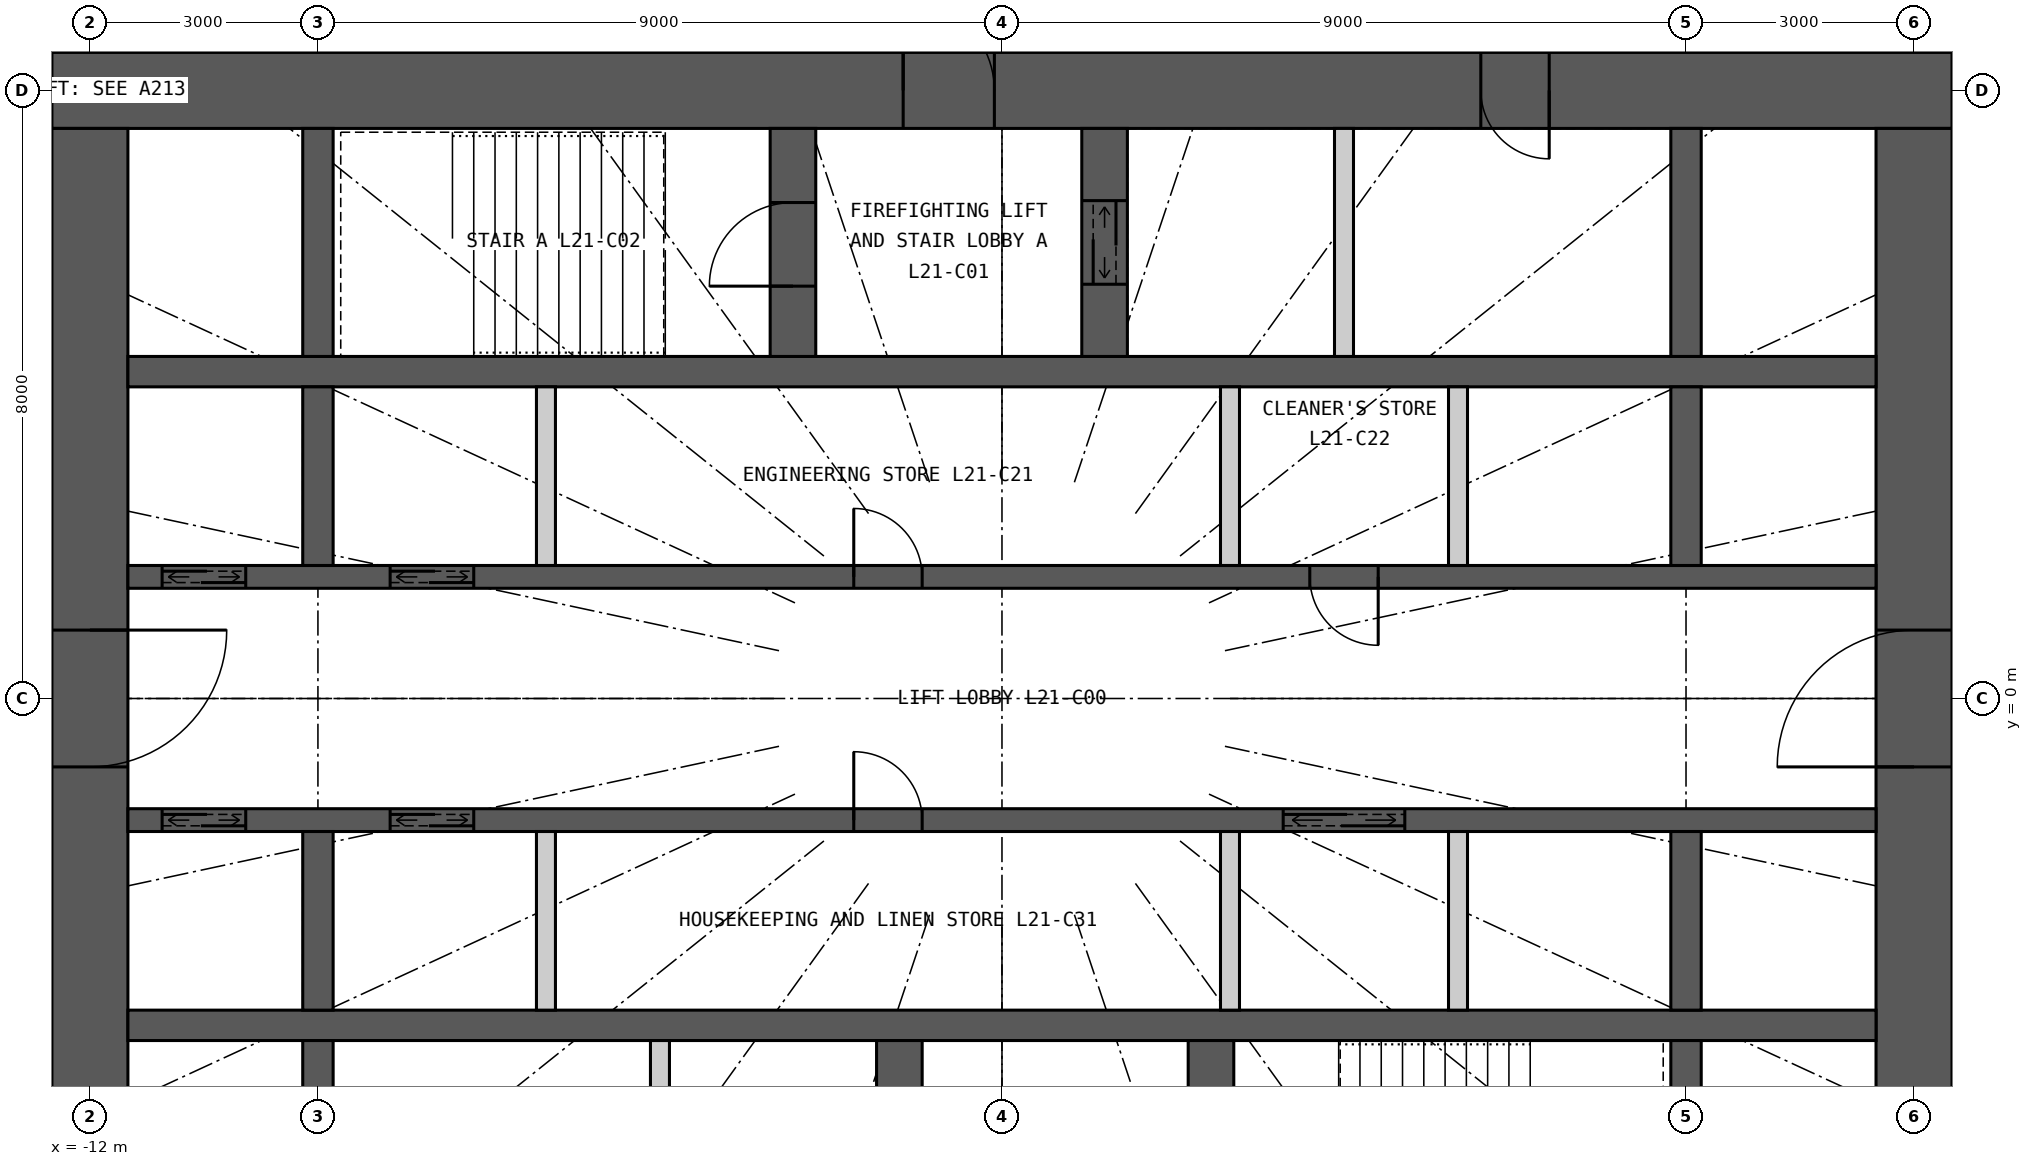
"""IFC4 building model, lengths in metres.
Left out: names, types, materials, properties, quantities, classifications, styles, units other than length and angle.
Written with IfcOpenShell. Run it as: python <this file> out.ifc"""

import sys

from ifc_helpers import new_model, si_unit, direction, frame, frame_2d, origin, place, context, subcontext, project, spatial, rectangle, extrude, element, fill, save


model = new_model("IFC4")
c1 = context("Model", 3, precision=1e-05, world=origin(), true_north=direction((0.0, 1.0)))
c2 = subcontext(c1, "Body", "Model", "MODEL_VIEW")
j1 = project(units=[si_unit("LENGTHUNIT", "METRE"), si_unit("PLANEANGLEUNIT", "RADIAN")], contexts=[c1])
p1 = place(None, origin())
s1 = spatial("IfcSite", under=j1, at=p1, CompositionType="ELEMENT")
p2 = place(p1, origin())
s2 = spatial("IfcBuilding", under=s1, at=p2, CompositionType="ELEMENT")
p3 = place(p2, frame((0.0, 0.0, 83.7)))
s3 = spatial("IfcBuildingStorey", under=s2, at=p3, CompositionType="ELEMENT", Elevation=83.7)
p4 = place(p3, frame((-12.5, 8.0, 0.0), z_axis=(0.0, 0.0, 1.0), x_axis=(1.0, 0.0, 0.0)))
e1 = element("IfcWall", 1, at=p4, inside=s3, PredefinedType="SHEAR", context=c2, shape_type="SweptSolid", body=[
    extrude(rectangle(XDim=25.0, YDim=1.0, at=frame_2d((12.5, 0.0))), origin(), (0.0, 0.0, 1.0), 3.3),
])
p5 = place(p4, frame((11.2, 0.0, 0.0)))
e2 = element("IfcOpeningElement", 2, at=p5, cuts=e1, PredefinedType="OPENING", context=c2, shape_type="SweptSolid", body=[
    extrude(rectangle(XDim=1.2, YDim=2.2, at=frame_2d((0.6, 1.1))), frame((0.0, 0.51, 0.0), z_axis=(0.0, -1.0, 0.0), x_axis=(1.0, 0.0, 0.0)), (0.0, 0.0, 1.0), 1.02),
])
p6 = place(p4, frame((18.8, 0.0, 0.0)))
e3 = element("IfcOpeningElement", 3, at=p6, cuts=e1, PredefinedType="OPENING", context=c2, shape_type="SweptSolid", body=[
    extrude(rectangle(XDim=0.9, YDim=2.2, at=frame_2d((0.45, 1.1))), frame((0.0, 0.51, 0.0), z_axis=(0.0, -1.0, 0.0), x_axis=(1.0, 0.0, 0.0)), (0.0, 0.0, 1.0), 1.02),
])
p7 = place(p3, frame((12.0, -7.5, 0.0), z_axis=(0.0, 0.0, 1.0), x_axis=(0.0, 1.0, 0.0)))
e4 = element("IfcWall", 4, at=p7, inside=s3, PredefinedType="SHEAR", context=c2, shape_type="SweptSolid", body=[
    extrude(rectangle(XDim=15.0, YDim=1.0, at=frame_2d((7.5, 0.0))), origin(), (0.0, 0.0, 1.0), 3.3),
])
p8 = place(p7, frame((6.6, 0.0, 0.0)))
e5 = element("IfcOpeningElement", 5, at=p8, cuts=e4, PredefinedType="OPENING", context=c2, shape_type="SweptSolid", body=[
    extrude(rectangle(XDim=1.8, YDim=2.2, at=frame_2d((0.9, 1.1))), frame((0.0, 0.51, 0.0), z_axis=(0.0, -1.0, 0.0), x_axis=(1.0, 0.0, 0.0)), (0.0, 0.0, 1.0), 1.02),
])
p9 = place(p3, frame((-12.0, 7.5, 0.0), z_axis=(0.0, 0.0, 1.0), x_axis=(0.0, -1.0, 0.0)))
e6 = element("IfcWall", 6, at=p9, inside=s3, PredefinedType="SHEAR", context=c2, shape_type="SweptSolid", body=[
    extrude(rectangle(XDim=15.0, YDim=1.0, at=frame_2d((7.5, 0.0))), origin(), (0.0, 0.0, 1.0), 3.3),
])
p10 = place(p9, frame((6.6, 0.0, 0.0)))
e7 = element("IfcOpeningElement", 7, at=p10, cuts=e6, PredefinedType="OPENING", context=c2, shape_type="SweptSolid", body=[
    extrude(rectangle(XDim=1.8, YDim=2.2, at=frame_2d((0.9, 1.1))), frame((0.0, 0.51, 0.0), z_axis=(0.0, -1.0, 0.0), x_axis=(1.0, 0.0, 0.0)), (0.0, 0.0, 1.0), 1.02),
])
p11 = place(p3, frame((-11.5, 4.3, 0.0), z_axis=(0.0, 0.0, 1.0), x_axis=(1.0, 0.0, 0.0)))
e8 = element("IfcWall", 8, at=p11, inside=s3, PredefinedType="SHEAR", context=c2, shape_type="SweptSolid", body=[
    extrude(rectangle(XDim=23.0, YDim=0.4, at=frame_2d((11.5, 0.0))), origin(), (0.0, 0.0, 1.0), 3.3),
])
p12 = place(p3, frame((-11.5, 1.6, 0.0), z_axis=(0.0, 0.0, 1.0), x_axis=(1.0, 0.0, 0.0)))
e9 = element("IfcWall", 9, at=p12, inside=s3, PredefinedType="SHEAR", context=c2, shape_type="SweptSolid", body=[
    extrude(rectangle(XDim=23.0, YDim=0.3, at=frame_2d((11.5, 0.0))), origin(), (0.0, 0.0, 1.0), 3.3),
])
p13 = place(p12, frame((0.45, 0.0, 0.0)))
e10 = element("IfcOpeningElement", 10, at=p13, cuts=e9, PredefinedType="OPENING", context=c2, shape_type="SweptSolid", body=[
    extrude(rectangle(XDim=1.1, YDim=2.2, at=frame_2d((0.55, 1.1))), frame((0.0, 0.16, 0.0), z_axis=(0.0, -1.0, 0.0), x_axis=(1.0, 0.0, 0.0)), (0.0, 0.0, 1.0), 0.32),
])
p14 = place(p12, frame((3.45, 0.0, 0.0)))
e11 = element("IfcOpeningElement", 11, at=p14, cuts=e9, PredefinedType="OPENING", context=c2, shape_type="SweptSolid", body=[
    extrude(rectangle(XDim=1.1, YDim=2.2, at=frame_2d((0.55, 1.1))), frame((0.0, 0.16, 0.0), z_axis=(0.0, -1.0, 0.0), x_axis=(1.0, 0.0, 0.0)), (0.0, 0.0, 1.0), 0.32),
])
p15 = place(p12, frame((9.55, 0.0, 0.0)))
e12 = element("IfcOpeningElement", 12, at=p15, cuts=e9, PredefinedType="OPENING", context=c2, shape_type="SweptSolid", body=[
    extrude(rectangle(XDim=0.9, YDim=2.2, at=frame_2d((0.45, 1.1))), frame((0.0, 0.16, 0.0), z_axis=(0.0, -1.0, 0.0), x_axis=(1.0, 0.0, 0.0)), (0.0, 0.0, 1.0), 0.32),
])
p16 = place(p12, frame((15.55, 0.0, 0.0)))
e13 = element("IfcOpeningElement", 13, at=p16, cuts=e9, PredefinedType="OPENING", context=c2, shape_type="SweptSolid", body=[
    extrude(rectangle(XDim=0.9, YDim=2.2, at=frame_2d((0.45, 1.1))), frame((0.0, 0.16, 0.0), z_axis=(0.0, -1.0, 0.0), x_axis=(1.0, 0.0, 0.0)), (0.0, 0.0, 1.0), 0.32),
])
p17 = place(p3, frame((-11.5, -4.3, 0.0), z_axis=(0.0, 0.0, 1.0), x_axis=(1.0, 0.0, 0.0)))
e14 = element("IfcWall", 14, at=p17, inside=s3, PredefinedType="SHEAR", context=c2, shape_type="SweptSolid", body=[
    extrude(rectangle(XDim=23.0, YDim=0.4, at=frame_2d((11.5, 0.0))), origin(), (0.0, 0.0, 1.0), 3.3),
])
p18 = place(p3, frame((-11.5, -1.6, 0.0), z_axis=(0.0, 0.0, 1.0), x_axis=(1.0, 0.0, 0.0)))
e15 = element("IfcWall", 15, at=p18, inside=s3, PredefinedType="SHEAR", context=c2, shape_type="SweptSolid", body=[
    extrude(rectangle(XDim=23.0, YDim=0.3, at=frame_2d((11.5, 0.0))), origin(), (0.0, 0.0, 1.0), 3.3),
])
p19 = place(p18, frame((0.45, 0.0, 0.0)))
e16 = element("IfcOpeningElement", 16, at=p19, cuts=e15, PredefinedType="OPENING", context=c2, shape_type="SweptSolid", body=[
    extrude(rectangle(XDim=1.1, YDim=2.2, at=frame_2d((0.55, 1.1))), frame((0.0, 0.16, 0.0), z_axis=(0.0, -1.0, 0.0), x_axis=(1.0, 0.0, 0.0)), (0.0, 0.0, 1.0), 0.32),
])
p20 = place(p18, frame((3.45, 0.0, 0.0)))
e17 = element("IfcOpeningElement", 17, at=p20, cuts=e15, PredefinedType="OPENING", context=c2, shape_type="SweptSolid", body=[
    extrude(rectangle(XDim=1.1, YDim=2.2, at=frame_2d((0.55, 1.1))), frame((0.0, 0.16, 0.0), z_axis=(0.0, -1.0, 0.0), x_axis=(1.0, 0.0, 0.0)), (0.0, 0.0, 1.0), 0.32),
])
p21 = place(p18, frame((15.2, 0.0, 0.0)))
e18 = element("IfcOpeningElement", 18, at=p21, cuts=e15, PredefinedType="OPENING", context=c2, shape_type="SweptSolid", body=[
    extrude(rectangle(XDim=1.6, YDim=2.4, at=frame_2d((0.8, 1.2))), frame((0.0, 0.16, 0.0), z_axis=(0.0, -1.0, 0.0), x_axis=(1.0, 0.0, 0.0)), (0.0, 0.0, 1.0), 0.32),
])
p22 = place(p18, frame((9.55, 0.0, 0.0)))
e19 = element("IfcOpeningElement", 19, at=p22, cuts=e15, PredefinedType="OPENING", context=c2, shape_type="SweptSolid", body=[
    extrude(rectangle(XDim=0.9, YDim=2.2, at=frame_2d((0.45, 1.1))), frame((0.0, 0.16, 0.0), z_axis=(0.0, -1.0, 0.0), x_axis=(1.0, 0.0, 0.0)), (0.0, 0.0, 1.0), 0.32),
])
p23 = place(p3, frame((-9.0, 4.5, 0.0), z_axis=(0.0, 0.0, 1.0), x_axis=(0.0, 1.0, 0.0)))
e20 = element("IfcWall", 20, at=p23, inside=s3, PredefinedType="SHEAR", context=c2, shape_type="SweptSolid", body=[
    extrude(rectangle(XDim=3.0, YDim=0.4, at=frame_2d((1.5, 0.0))), origin(), (0.0, 0.0, 1.0), 3.3),
])
for number, where, z_axis, x_axis in (
    (21, (-9.0, 1.75, 0.0), (0.0, 0.0, 1.0), (0.0, 1.0, 0.0)),
    (22, (-9.0, -4.1, 0.0), (0.0, 0.0, 1.0), (0.0, 1.0, 0.0)),
):
    element("IfcWall", number, at=place(p3, frame(where, z_axis=z_axis, x_axis=x_axis)), inside=s3, PredefinedType="SHEAR", context=c2, shape_type="SweptSolid", body=[
        extrude(rectangle(XDim=2.35, YDim=0.4, at=frame_2d((1.175, 0.0))), origin(), (0.0, 0.0, 1.0), 3.3),
    ])
for number, where, z_axis, x_axis in (
    (23, (-9.0, -7.5, 0.0), (0.0, 0.0, 1.0), (0.0, 1.0, 0.0)),
    (24, (9.0, 4.5, 0.0), (0.0, 0.0, 1.0), (0.0, 1.0, 0.0)),
):
    element("IfcWall", number, at=place(p3, frame(where, z_axis=z_axis, x_axis=x_axis)), inside=s3, PredefinedType="SHEAR", context=c2, shape_type="SweptSolid", body=[
        extrude(rectangle(XDim=3.0, YDim=0.4, at=frame_2d((1.5, 0.0))), origin(), (0.0, 0.0, 1.0), 3.3),
    ])
for number, where, z_axis, x_axis in (
    (25, (9.0, 1.75, 0.0), (0.0, 0.0, 1.0), (0.0, 1.0, 0.0)),
    (26, (9.0, -4.1, 0.0), (0.0, 0.0, 1.0), (0.0, 1.0, 0.0)),
):
    element("IfcWall", number, at=place(p3, frame(where, z_axis=z_axis, x_axis=x_axis)), inside=s3, PredefinedType="SHEAR", context=c2, shape_type="SweptSolid", body=[
        extrude(rectangle(XDim=2.35, YDim=0.4, at=frame_2d((1.175, 0.0))), origin(), (0.0, 0.0, 1.0), 3.3),
    ])
p24 = place(p3, frame((9.0, -7.5, 0.0), z_axis=(0.0, 0.0, 1.0), x_axis=(0.0, 1.0, 0.0)))
e27 = element("IfcWall", 27, at=p24, inside=s3, PredefinedType="SHEAR", context=c2, shape_type="SweptSolid", body=[
    extrude(rectangle(XDim=3.0, YDim=0.4, at=frame_2d((1.5, 0.0))), origin(), (0.0, 0.0, 1.0), 3.3),
])
p25 = place(p3, frame((-2.75, 4.5, 0.0), z_axis=(0.0, 0.0, 1.0), x_axis=(0.0, 1.0, 0.0)))
e28 = element("IfcWall", 28, at=p25, inside=s3, PredefinedType="SHEAR", context=c2, shape_type="SweptSolid", body=[
    extrude(rectangle(XDim=3.0, YDim=0.6, at=frame_2d((1.5, 0.0))), origin(), (0.0, 0.0, 1.0), 3.3),
])
p26 = place(p25, frame((0.925, 0.0, 0.0)))
e29 = element("IfcOpeningElement", 29, at=p26, cuts=e28, PredefinedType="OPENING", context=c2, shape_type="SweptSolid", body=[
    extrude(rectangle(XDim=1.1, YDim=2.2, at=frame_2d((0.55, 1.1))), frame((0.0, 0.31, 0.0), z_axis=(0.0, -1.0, 0.0), x_axis=(1.0, 0.0, 0.0)), (0.0, 0.0, 1.0), 0.62),
])
p27 = place(p3, frame((1.35, 4.5, 0.0), z_axis=(0.0, 0.0, 1.0), x_axis=(0.0, 1.0, 0.0)))
e30 = element("IfcWall", 30, at=p27, inside=s3, PredefinedType="SHEAR", context=c2, shape_type="SweptSolid", body=[
    extrude(rectangle(XDim=3.0, YDim=0.6, at=frame_2d((1.5, 0.0))), origin(), (0.0, 0.0, 1.0), 3.3),
])
p28 = place(p27, frame((0.95, 0.0, 0.0)))
e31 = element("IfcOpeningElement", 31, at=p28, cuts=e30, PredefinedType="OPENING", context=c2, shape_type="SweptSolid", body=[
    extrude(rectangle(XDim=1.1, YDim=2.2, at=frame_2d((0.55, 1.1))), frame((0.0, 0.31, 0.0), z_axis=(0.0, -1.0, 0.0), x_axis=(1.0, 0.0, 0.0)), (0.0, 0.0, 1.0), 0.62),
])
p29 = place(p3, frame((4.5, 4.5, 0.0), z_axis=(0.0, 0.0, 1.0), x_axis=(0.0, 1.0, 0.0)))
e32 = element("IfcWall", 32, at=p29, inside=s3, PredefinedType="PARTITIONING", context=c2, shape_type="SweptSolid", body=[
    extrude(rectangle(XDim=3.0, YDim=0.25, at=frame_2d((1.5, 0.0))), origin(), (0.0, 0.0, 1.0), 3.3),
])
p30 = place(p3, frame((2.75, -7.5, 0.0), z_axis=(0.0, 0.0, 1.0), x_axis=(0.0, 1.0, 0.0)))
e33 = element("IfcWall", 33, at=p30, inside=s3, PredefinedType="SHEAR", context=c2, shape_type="SweptSolid", body=[
    extrude(rectangle(XDim=3.0, YDim=0.6, at=frame_2d((1.5, 0.0))), origin(), (0.0, 0.0, 1.0), 3.3),
])
p31 = place(p30, frame((0.975, 0.0, 0.0)))
e34 = element("IfcOpeningElement", 34, at=p31, cuts=e33, PredefinedType="OPENING", context=c2, shape_type="SweptSolid", body=[
    extrude(rectangle(XDim=1.1, YDim=2.2, at=frame_2d((0.55, 1.1))), frame((0.0, 0.31, 0.0), z_axis=(0.0, -1.0, 0.0), x_axis=(1.0, 0.0, 0.0)), (0.0, 0.0, 1.0), 0.62),
])
p32 = place(p3, frame((-1.35, -7.5, 0.0), z_axis=(0.0, 0.0, 1.0), x_axis=(0.0, 1.0, 0.0)))
e35 = element("IfcWall", 35, at=p32, inside=s3, PredefinedType="SHEAR", context=c2, shape_type="SweptSolid", body=[
    extrude(rectangle(XDim=3.0, YDim=0.6, at=frame_2d((1.5, 0.0))), origin(), (0.0, 0.0, 1.0), 3.3),
])
p33 = place(p32, frame((0.95, 0.0, 0.0)))
e36 = element("IfcOpeningElement", 36, at=p33, cuts=e35, PredefinedType="OPENING", context=c2, shape_type="SweptSolid", body=[
    extrude(rectangle(XDim=1.1, YDim=2.2, at=frame_2d((0.55, 1.1))), frame((0.0, 0.31, 0.0), z_axis=(0.0, -1.0, 0.0), x_axis=(1.0, 0.0, 0.0)), (0.0, 0.0, 1.0), 0.62),
])
p34 = place(p3, frame((-4.5, -7.5, 0.0), z_axis=(0.0, 0.0, 1.0), x_axis=(0.0, 1.0, 0.0)))
e37 = element("IfcWall", 37, at=p34, inside=s3, PredefinedType="PARTITIONING", context=c2, shape_type="SweptSolid", body=[
    extrude(rectangle(XDim=3.0, YDim=0.25, at=frame_2d((1.5, 0.0))), origin(), (0.0, 0.0, 1.0), 3.3),
])
for number, where, z_axis, x_axis in (
    (38, (-6.0, 1.75, 0.0), (0.0, 0.0, 1.0), (0.0, 1.0, 0.0)),
    (39, (3.0, 1.75, 0.0), (0.0, 0.0, 1.0), (0.0, 1.0, 0.0)),
    (40, (6.0, 1.75, 0.0), (0.0, 0.0, 1.0), (0.0, 1.0, 0.0)),
    (41, (-6.0, -4.1, 0.0), (0.0, 0.0, 1.0), (0.0, 1.0, 0.0)),
    (42, (3.0, -4.1, 0.0), (0.0, 0.0, 1.0), (0.0, 1.0, 0.0)),
    (43, (6.0, -4.1, 0.0), (0.0, 0.0, 1.0), (0.0, 1.0, 0.0)),
):
    element("IfcWall", number, at=place(p3, frame(where, z_axis=z_axis, x_axis=x_axis)), inside=s3, PredefinedType="PARTITIONING", context=c2, shape_type="SweptSolid", body=[
        extrude(rectangle(XDim=2.35, YDim=0.25, at=frame_2d((1.175, 0.0))), origin(), (0.0, 0.0, 1.0), 3.3),
    ])
p35 = place(p5, origin())
e44 = element("IfcDoor", 44, at=p35, inside=s3, OperationType="SINGLE_SWING_LEFT", PredefinedType="DOOR", context=c2, shape_type="SweptSolid", body=[
    extrude(rectangle(XDim=1.2, YDim=2.2, at=frame_2d((0.6, 1.1))), frame((0.0, 0.025, 0.0), z_axis=(0.0, -1.0, 0.0), x_axis=(1.0, 0.0, 0.0)), (0.0, 0.0, 1.0), 0.05),
])
fill(e2, e44)
p36 = place(p26, origin())
e45 = element("IfcDoor", 45, at=p36, inside=s3, OperationType="SINGLE_SWING_LEFT", PredefinedType="DOOR", context=c2, shape_type="SweptSolid", body=[
    extrude(rectangle(XDim=1.1, YDim=2.2, at=frame_2d((0.55, 1.1))), frame((0.0, 0.025, 0.0), z_axis=(0.0, -1.0, 0.0), x_axis=(1.0, 0.0, 0.0)), (0.0, 0.0, 1.0), 0.05),
])
fill(e29, e45)
p37 = place(p28, origin())
e46 = element("IfcDoor", 46, at=p37, inside=s3, OperationType="DOUBLE_DOOR_SLIDING", PredefinedType="DOOR", context=c2, shape_type="SweptSolid", body=[
    extrude(rectangle(XDim=1.1, YDim=2.2, at=frame_2d((0.55, 1.1))), frame((0.0, 0.025, 0.0), z_axis=(0.0, -1.0, 0.0), x_axis=(1.0, 0.0, 0.0)), (0.0, 0.0, 1.0), 0.05),
])
fill(e31, e46)
p38 = place(p6, origin())
e47 = element("IfcDoor", 47, at=p38, inside=s3, OperationType="SINGLE_SWING_RIGHT", PredefinedType="DOOR", context=c2, shape_type="SweptSolid", body=[
    extrude(rectangle(XDim=0.9, YDim=2.2, at=frame_2d((0.45, 1.1))), frame((0.0, 0.025, 0.0), z_axis=(0.0, -1.0, 0.0), x_axis=(1.0, 0.0, 0.0)), (0.0, 0.0, 1.0), 0.05),
])
fill(e3, e47)
p39 = place(p13, origin())
e48 = element("IfcDoor", 48, at=p39, inside=s3, OperationType="DOUBLE_DOOR_SLIDING", PredefinedType="DOOR", context=c2, shape_type="SweptSolid", body=[
    extrude(rectangle(XDim=1.1, YDim=2.2, at=frame_2d((0.55, 1.1))), frame((0.0, 0.025, 0.0), z_axis=(0.0, -1.0, 0.0), x_axis=(1.0, 0.0, 0.0)), (0.0, 0.0, 1.0), 0.05),
])
fill(e10, e48)
p40 = place(p14, origin())
e49 = element("IfcDoor", 49, at=p40, inside=s3, OperationType="DOUBLE_DOOR_SLIDING", PredefinedType="DOOR", context=c2, shape_type="SweptSolid", body=[
    extrude(rectangle(XDim=1.1, YDim=2.2, at=frame_2d((0.55, 1.1))), frame((0.0, 0.025, 0.0), z_axis=(0.0, -1.0, 0.0), x_axis=(1.0, 0.0, 0.0)), (0.0, 0.0, 1.0), 0.05),
])
fill(e11, e49)
p41 = place(p19, origin())
e50 = element("IfcDoor", 50, at=p41, inside=s3, OperationType="DOUBLE_DOOR_SLIDING", PredefinedType="DOOR", context=c2, shape_type="SweptSolid", body=[
    extrude(rectangle(XDim=1.1, YDim=2.2, at=frame_2d((0.55, 1.1))), frame((0.0, 0.025, 0.0), z_axis=(0.0, -1.0, 0.0), x_axis=(1.0, 0.0, 0.0)), (0.0, 0.0, 1.0), 0.05),
])
fill(e16, e50)
p42 = place(p20, origin())
e51 = element("IfcDoor", 51, at=p42, inside=s3, OperationType="DOUBLE_DOOR_SLIDING", PredefinedType="DOOR", context=c2, shape_type="SweptSolid", body=[
    extrude(rectangle(XDim=1.1, YDim=2.2, at=frame_2d((0.55, 1.1))), frame((0.0, 0.025, 0.0), z_axis=(0.0, -1.0, 0.0), x_axis=(1.0, 0.0, 0.0)), (0.0, 0.0, 1.0), 0.05),
])
fill(e17, e51)
p43 = place(p21, origin())
e52 = element("IfcDoor", 52, at=p43, inside=s3, OperationType="DOUBLE_DOOR_SLIDING", PredefinedType="DOOR", context=c2, shape_type="SweptSolid", body=[
    extrude(rectangle(XDim=1.6, YDim=2.4, at=frame_2d((0.8, 1.2))), frame((0.0, 0.025, 0.0), z_axis=(0.0, -1.0, 0.0), x_axis=(1.0, 0.0, 0.0)), (0.0, 0.0, 1.0), 0.05),
])
fill(e18, e52)
p44 = place(p15, origin())
e53 = element("IfcDoor", 53, at=p44, inside=s3, OperationType="SINGLE_SWING_LEFT", PredefinedType="DOOR", context=c2, shape_type="SweptSolid", body=[
    extrude(rectangle(XDim=0.9, YDim=2.2, at=frame_2d((0.45, 1.1))), frame((0.0, 0.025, 0.0), z_axis=(0.0, -1.0, 0.0), x_axis=(1.0, 0.0, 0.0)), (0.0, 0.0, 1.0), 0.05),
])
fill(e12, e53)
p45 = place(p16, origin())
e54 = element("IfcDoor", 54, at=p45, inside=s3, OperationType="SINGLE_SWING_RIGHT", PredefinedType="DOOR", context=c2, shape_type="SweptSolid", body=[
    extrude(rectangle(XDim=0.9, YDim=2.2, at=frame_2d((0.45, 1.1))), frame((0.0, 0.025, 0.0), z_axis=(0.0, -1.0, 0.0), x_axis=(1.0, 0.0, 0.0)), (0.0, 0.0, 1.0), 0.05),
])
fill(e13, e54)
p46 = place(p22, origin())
e55 = element("IfcDoor", 55, at=p46, inside=s3, OperationType="SINGLE_SWING_LEFT", PredefinedType="DOOR", context=c2, shape_type="SweptSolid", body=[
    extrude(rectangle(XDim=0.9, YDim=2.2, at=frame_2d((0.45, 1.1))), frame((0.0, 0.025, 0.0), z_axis=(0.0, -1.0, 0.0), x_axis=(1.0, 0.0, 0.0)), (0.0, 0.0, 1.0), 0.05),
])
fill(e19, e55)
p47 = place(p8, origin())
e56 = element("IfcDoor", 56, at=p47, inside=s3, OperationType="DOUBLE_DOOR_DOUBLE_SWING", PredefinedType="DOOR", context=c2, shape_type="SweptSolid", body=[
    extrude(rectangle(XDim=1.8, YDim=2.2, at=frame_2d((0.9, 1.1))), frame((0.0, 0.025, 0.0), z_axis=(0.0, -1.0, 0.0), x_axis=(1.0, 0.0, 0.0)), (0.0, 0.0, 1.0), 0.05),
])
fill(e5, e56)
p48 = place(p10, origin())
e57 = element("IfcDoor", 57, at=p48, inside=s3, OperationType="DOUBLE_DOOR_DOUBLE_SWING", PredefinedType="DOOR", context=c2, shape_type="SweptSolid", body=[
    extrude(rectangle(XDim=1.8, YDim=2.2, at=frame_2d((0.9, 1.1))), frame((0.0, 0.025, 0.0), z_axis=(0.0, -1.0, 0.0), x_axis=(1.0, 0.0, 0.0)), (0.0, 0.0, 1.0), 0.05),
])
fill(e7, e57)
save(model, sys.argv[1])
